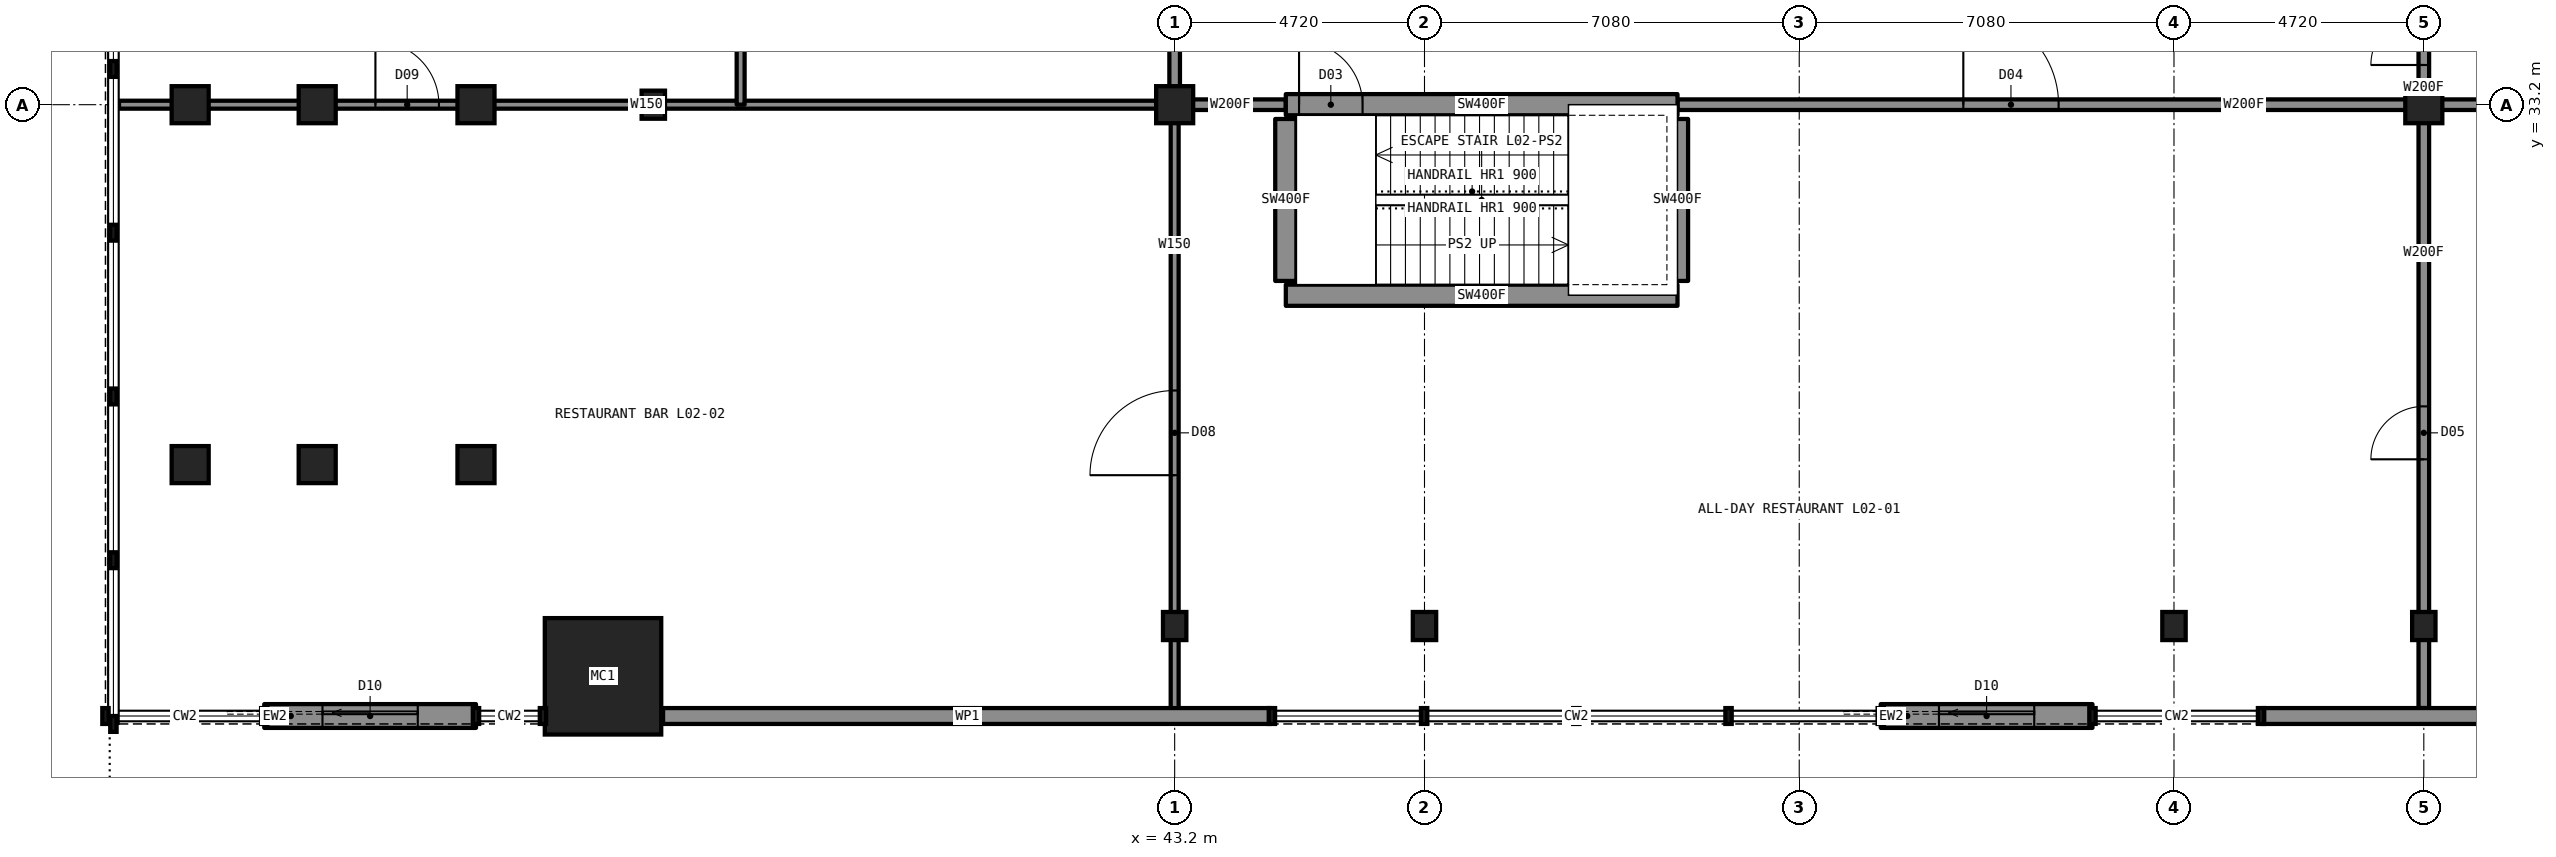
"""IFC4 building model, lengths in metres.
Left out: names, types, materials, properties, quantities, classifications, styles, units other than length and angle.
Written with IfcOpenShell. Run it as: python <this file> out.ifc"""

import sys

from ifc_helpers import new_model, si_unit, direction, frame, frame_2d, origin, origin_2d, place, context, subcontext, project, spatial, rectangle, hollow_rectangle, i_section, extrude, element, fill, save


model = new_model("IFC4")
c1 = context("Model", 3, precision=1e-05, world=origin(), true_north=direction((0.0, 1.0)))
c2 = subcontext(c1, "Body", "Model", "MODEL_VIEW")
j1 = project(units=[si_unit("LENGTHUNIT", "METRE"), si_unit("PLANEANGLEUNIT", "RADIAN")], contexts=[c1])
p1 = place(None, origin())
s1 = spatial("IfcSite", under=j1, at=p1, CompositionType="ELEMENT")
p2 = place(p1, origin())
s2 = spatial("IfcBuilding", under=s1, at=p2, CompositionType="ELEMENT")
p3 = place(p2, frame((0.0, 0.0, 11.0)))
s3 = spatial("IfcBuildingStorey", under=s2, at=p3, CompositionType="ELEMENT", Elevation=11.0)
for number, where, z_axis, x_axis in (
    (1, (33.35, 33.2, 0.0), (0.0, 0.0, 1.0), (1.0, 0.0, 0.0)),
    (2, (43.2, 23.35, 0.0), (0.0, 0.0, 1.0), (1.0, 0.0, 0.0)),
    (3, (47.92, 23.35, 0.0), (0.0, 0.0, 1.0), (1.0, 0.0, 0.0)),
    (4, (62.08, 23.35, 0.0), (0.0, 0.0, 1.0), (1.0, 0.0, 0.0)),
    (5, (66.8, 23.35, 0.0), (0.0, 0.0, 1.0), (1.0, 0.0, 0.0)),
):
    element("IfcColumn", number, at=place(p3, frame(where, z_axis=z_axis, x_axis=x_axis)), inside=s3, PredefinedType="COLUMN", context=c2, shape_type="SweptSolid", body=[
        extrude(i_section(OverallWidth=0.442, OverallDepth=0.531, WebThickness=0.066, FlangeThickness=0.106, at=origin_2d()), origin(), (0.0, 0.0, 1.0), 5.0),
    ])
for number, where, z_axis, x_axis in (
    (6, (43.2, 33.2, 0.0), (0.0, 0.0, 1.0), (1.0, 0.0, 0.0)),
    (7, (66.8, 33.2, 0.0), (0.0, 0.0, 1.0), (1.0, 0.0, 0.0)),
):
    element("IfcColumn", number, at=place(p3, frame(where, z_axis=z_axis, x_axis=x_axis)), inside=s3, PredefinedType="COLUMN", context=c2, shape_type="SweptSolid", body=[
        extrude(hollow_rectangle(XDim=0.7, YDim=0.7, WallThickness=0.06, at=origin_2d()), origin(), (0.0, 0.0, 1.0), 5.0),
    ])
p4 = place(p3, frame((32.4, 22.4, 0.0), z_axis=(0.0, 0.0, 1.0), x_axis=(1.0, 0.0, 0.0)))
e8 = element("IfcColumn", 8, at=p4, inside=s3, PredefinedType="COLUMN", context=c2, shape_type="SweptSolid", body=[
    extrude(hollow_rectangle(XDim=2.2, YDim=2.2, WallThickness=0.15, at=origin_2d()), origin(), (0.0, 0.0, 1.0), 5.0),
])
for number, where, z_axis, x_axis in (
    (9, (24.6, 26.4, 0.0), (0.0, 0.0, 1.0), (1.0, 0.0, 0.0)),
    (10, (24.6, 33.2, 0.0), (0.0, 0.0, 1.0), (1.0, 0.0, 0.0)),
    (11, (27.0, 26.4, 0.0), (0.0, 0.0, 1.0), (1.0, 0.0, 0.0)),
    (12, (27.0, 33.2, 0.0), (0.0, 0.0, 1.0), (1.0, 0.0, 0.0)),
    (13, (30.0, 26.4, 0.0), (0.0, 0.0, 1.0), (1.0, 0.0, 0.0)),
    (14, (30.0, 33.2, 0.0), (0.0, 0.0, 1.0), (1.0, 0.0, 0.0)),
):
    element("IfcColumn", number, at=place(p3, frame(where, z_axis=z_axis, x_axis=x_axis)), inside=s3, PredefinedType="COLUMN", context=c2, shape_type="SweptSolid", body=[
        extrude(rectangle(XDim=0.7, YDim=0.7, at=origin_2d()), origin(), (0.0, 0.0, 1.0), 5.0),
    ])
p5 = place(p3, frame((43.2, 33.2, 0.0), z_axis=(0.0, 0.0, 1.0), x_axis=(1.0, 0.0, 0.0)))
e15 = element("IfcWall", 15, at=p5, inside=s3, PredefinedType="PARTITIONING", context=c2, shape_type="SweptSolid", body=[
    extrude(rectangle(XDim=2.1, YDim=0.2, at=frame_2d((1.05, 0.0))), origin(), (0.0, 0.0, 1.0), 4.65),
])
p6 = place(p3, frame((52.7, 33.2, 0.0), z_axis=(0.0, 0.0, 1.0), x_axis=(1.0, 0.0, 0.0)))
e16 = element("IfcWall", 16, at=p6, inside=s3, PredefinedType="PARTITIONING", context=c2, shape_type="SweptSolid", body=[
    extrude(rectangle(XDim=14.1, YDim=0.2, at=frame_2d((7.05, 0.0))), origin(), (0.0, 0.0, 1.0), 4.65),
])
p7 = place(p6, frame((5.4, 0.0, 0.0)))
e17 = element("IfcOpeningElement", 17, at=p7, cuts=e16, PredefinedType="OPENING", context=c2, shape_type="SweptSolid", body=[
    extrude(rectangle(XDim=1.8, YDim=2.2, at=frame_2d((0.9, 1.1))), frame((0.0, 0.11, 0.0), z_axis=(0.0, -1.0, 0.0), x_axis=(1.0, 0.0, 0.0)), (0.0, 0.0, 1.0), 0.22),
])
p8 = place(p3, frame((66.8, 33.2, 0.0), z_axis=(0.0, 0.0, 1.0), x_axis=(1.0, 0.0, 0.0)))
e18 = element("IfcWall", 18, at=p8, inside=s3, PredefinedType="PARTITIONING", context=c2, shape_type="SweptSolid", body=[
    extrude(rectangle(XDim=12.9, YDim=0.2, at=frame_2d((6.45, 0.0))), origin(), (0.0, 0.0, 1.0), 4.65),
])
p9 = place(p8, frame((5.7, 0.0, 0.0)))
e19 = element("IfcOpeningElement", 19, at=p9, cuts=e18, PredefinedType="OPENING", context=c2, shape_type="SweptSolid", body=[
    extrude(rectangle(XDim=1.0, YDim=2.1, at=frame_2d((0.5, 1.05))), frame((0.0, 0.11, 0.0), z_axis=(0.0, -1.0, 0.0), x_axis=(1.0, 0.0, 0.0)), (0.0, 0.0, 1.0), 0.22),
])
p10 = place(p3, frame((23.255, 33.2, 0.0), z_axis=(0.0, 0.0, 1.0), x_axis=(1.0, 0.0, 0.0)))
e20 = element("IfcWall", 20, at=p10, inside=s3, PredefinedType="PARTITIONING", context=c2, shape_type="SweptSolid", body=[
    extrude(rectangle(XDim=19.945, YDim=0.15, at=frame_2d((9.973, 0.0))), origin(), (0.0, 0.0, 1.0), 4.65),
])
p11 = place(p10, frame((4.845, 0.0, 0.0)))
e21 = element("IfcOpeningElement", 21, at=p11, cuts=e20, PredefinedType="OPENING", context=c2, shape_type="SweptSolid", body=[
    extrude(rectangle(XDim=1.2, YDim=2.2, at=frame_2d((0.6, 1.1))), frame((0.0, 0.085, 0.0), z_axis=(0.0, -1.0, 0.0), x_axis=(1.0, 0.0, 0.0)), (0.0, 0.0, 1.0), 0.17),
])
p12 = place(p3, frame((45.3, 33.2, 0.0), z_axis=(0.0, 0.0, 1.0), x_axis=(1.0, 0.0, 0.0)))
e22 = element("IfcWall", 22, at=p12, inside=s3, PredefinedType="SHEAR", context=c2, shape_type="SweptSolid", body=[
    extrude(rectangle(XDim=7.4, YDim=0.4, at=frame_2d((3.7, 0.0))), origin(), (0.0, 0.0, 1.0), 5.0),
])
p13 = place(p12, frame((0.25, 0.0, 0.0)))
e23 = element("IfcOpeningElement", 23, at=p13, cuts=e22, PredefinedType="OPENING", context=c2, shape_type="SweptSolid", body=[
    extrude(rectangle(XDim=1.2, YDim=2.2, at=frame_2d((0.6, 1.1))), frame((0.0, 0.21, 0.0), z_axis=(0.0, -1.0, 0.0), x_axis=(1.0, 0.0, 0.0)), (0.0, 0.0, 1.0), 0.42),
])
p14 = place(p3, frame((45.3, 29.6, 0.0), z_axis=(0.0, 0.0, 1.0), x_axis=(1.0, 0.0, 0.0)))
e24 = element("IfcWall", 24, at=p14, inside=s3, PredefinedType="SHEAR", context=c2, shape_type="SweptSolid", body=[
    extrude(rectangle(XDim=7.4, YDim=0.4, at=frame_2d((3.7, 0.0))), origin(), (0.0, 0.0, 1.0), 5.0),
])
p15 = place(p3, frame((43.2, 33.2, 0.0), z_axis=(0.0, 0.0, 1.0), x_axis=(0.0, 1.0, 0.0)))
e25 = element("IfcWall", 25, at=p15, inside=s3, PredefinedType="PARTITIONING", context=c2, shape_type="SweptSolid", body=[
    extrude(rectangle(XDim=14.1, YDim=0.2, at=frame_2d((7.05, 0.0))), origin(), (0.0, 0.0, 1.0), 4.65),
])
p16 = place(p15, frame((12.4, 0.0, 0.0)))
e26 = element("IfcOpeningElement", 26, at=p16, cuts=e25, PredefinedType="OPENING", context=c2, shape_type="SweptSolid", body=[
    extrude(rectangle(XDim=1.0, YDim=2.1, at=frame_2d((0.5, 1.05))), frame((0.0, 0.11, 0.0), z_axis=(0.0, -1.0, 0.0), x_axis=(1.0, 0.0, 0.0)), (0.0, 0.0, 1.0), 0.22),
])
p17 = place(p15, frame((2.45, 0.0, 0.0)))
e27 = element("IfcOpeningElement", 27, at=p17, cuts=e25, PredefinedType="OPENING", context=c2, shape_type="SweptSolid", body=[
    extrude(rectangle(XDim=0.9, YDim=2.1, at=frame_2d((0.45, 1.05))), frame((0.0, 0.11, 0.0), z_axis=(0.0, -1.0, 0.0), x_axis=(1.0, 0.0, 0.0)), (0.0, 0.0, 1.0), 0.22),
])
p18 = place(p15, frame((8.25, 0.0, 0.0)))
e28 = element("IfcOpeningElement", 28, at=p18, cuts=e25, PredefinedType="OPENING", context=c2, shape_type="SweptSolid", body=[
    extrude(rectangle(XDim=0.9, YDim=2.1, at=frame_2d((0.45, 1.05))), frame((0.0, 0.11, 0.0), z_axis=(0.0, -1.0, 0.0), x_axis=(1.0, 0.0, 0.0)), (0.0, 0.0, 1.0), 0.22),
])
p19 = place(p3, frame((43.2, 21.755, 0.0), z_axis=(0.0, 0.0, 1.0), x_axis=(0.0, 1.0, 0.0)))
e29 = element("IfcWall", 29, at=p19, inside=s3, PredefinedType="PARTITIONING", context=c2, shape_type="SweptSolid", body=[
    extrude(rectangle(XDim=11.445, YDim=0.15, at=frame_2d((5.723, 0.0))), origin(), (0.0, 0.0, 1.0), 4.65),
])
p20 = place(p19, frame((4.445, 0.0, 0.0)))
e30 = element("IfcOpeningElement", 30, at=p20, cuts=e29, PredefinedType="OPENING", context=c2, shape_type="SweptSolid", body=[
    extrude(rectangle(XDim=1.6, YDim=2.4, at=frame_2d((0.8, 1.2))), frame((0.0, 0.085, 0.0), z_axis=(0.0, -1.0, 0.0), x_axis=(1.0, 0.0, 0.0)), (0.0, 0.0, 1.0), 0.17),
])
p21 = place(p3, frame((52.7, 29.87, 0.0), z_axis=(0.0, 0.0, 1.0), x_axis=(0.0, 1.0, 0.0)))
e31 = element("IfcWall", 31, at=p21, inside=s3, PredefinedType="SHEAR", context=c2, shape_type="SweptSolid", body=[
    extrude(rectangle(XDim=3.06, YDim=0.4, at=frame_2d((1.53, 0.0))), origin(), (0.0, 0.0, 1.0), 5.0),
])
p22 = place(p3, frame((35.0, 33.2, 0.0), z_axis=(0.0, 0.0, 1.0), x_axis=(0.0, 1.0, 0.0)))
e32 = element("IfcWall", 32, at=p22, inside=s3, PredefinedType="PARTITIONING", context=c2, shape_type="SweptSolid", body=[
    extrude(rectangle(XDim=23.6, YDim=0.15, at=frame_2d((11.8, 0.0))), origin(), (0.0, 0.0, 1.0), 4.65),
])
p23 = place(p3, frame((45.3, 29.87, 0.0), z_axis=(0.0, 0.0, 1.0), x_axis=(0.0, 1.0, 0.0)))
e33 = element("IfcWall", 33, at=p23, inside=s3, PredefinedType="SHEAR", context=c2, shape_type="SweptSolid", body=[
    extrude(rectangle(XDim=3.06, YDim=0.4, at=frame_2d((1.53, 0.0))), origin(), (0.0, 0.0, 1.0), 5.0),
])
p24 = place(p3, frame((66.8, 33.2, 0.0), z_axis=(0.0, 0.0, 1.0), x_axis=(0.0, 1.0, 0.0)))
e34 = element("IfcWall", 34, at=p24, inside=s3, PredefinedType="PARTITIONING", context=c2, shape_type="SweptSolid", body=[
    extrude(rectangle(XDim=2.1, YDim=0.2, at=frame_2d((1.05, 0.0))), origin(), (0.0, 0.0, 1.0), 4.65),
])
p25 = place(p24, frame((0.75, 0.0, 0.0)))
e35 = element("IfcOpeningElement", 35, at=p25, cuts=e34, PredefinedType="OPENING", context=c2, shape_type="SweptSolid", body=[
    extrude(rectangle(XDim=1.0, YDim=2.1, at=frame_2d((0.5, 1.05))), frame((0.0, 0.11, 0.0), z_axis=(0.0, -1.0, 0.0), x_axis=(1.0, 0.0, 0.0)), (0.0, 0.0, 1.0), 0.22),
])
p26 = place(p3, frame((66.8, 21.8, 0.0), z_axis=(0.0, 0.0, 1.0), x_axis=(0.0, 1.0, 0.0)))
e36 = element("IfcWall", 36, at=p26, inside=s3, PredefinedType="PARTITIONING", context=c2, shape_type="SweptSolid", body=[
    extrude(rectangle(XDim=11.4, YDim=0.2, at=frame_2d((5.7, 0.0))), origin(), (0.0, 0.0, 1.0), 4.65),
])
p27 = place(p26, frame((4.7, 0.0, 0.0)))
e37 = element("IfcOpeningElement", 37, at=p27, cuts=e36, PredefinedType="OPENING", context=c2, shape_type="SweptSolid", body=[
    extrude(rectangle(XDim=1.0, YDim=2.1, at=frame_2d((0.5, 1.05))), frame((0.0, 0.11, 0.0), z_axis=(0.0, -1.0, 0.0), x_axis=(1.0, 0.0, 0.0)), (0.0, 0.0, 1.0), 0.22),
])
p28 = place(p3, frame((26.0, 21.65, 0.0), z_axis=(0.0, 0.0, 1.0), x_axis=(1.0, 0.0, 0.0)))
e38 = element("IfcWall", 38, at=p28, inside=s3, PredefinedType="SOLIDWALL", context=c2, shape_type="SweptSolid", body=[
    extrude(rectangle(XDim=4.0, YDim=0.45, at=frame_2d((2.0, 0.0))), origin(), (0.0, 0.0, 1.0), 4.65),
])
p29 = place(p28, frame((1.1, 0.0, 0.0)))
e39 = element("IfcOpeningElement", 39, at=p29, cuts=e38, PredefinedType="OPENING", context=c2, shape_type="SweptSolid", body=[
    extrude(rectangle(XDim=1.8, YDim=2.4, at=frame_2d((0.9, 1.2))), frame((0.0, 0.235, 0.0), z_axis=(0.0, -1.0, 0.0), x_axis=(1.0, 0.0, 0.0)), (0.0, 0.0, 1.0), 0.47),
])
p30 = place(p3, frame((56.54, 21.65, 0.0), z_axis=(0.0, 0.0, 1.0), x_axis=(1.0, 0.0, 0.0)))
e40 = element("IfcWall", 40, at=p30, inside=s3, PredefinedType="SOLIDWALL", context=c2, shape_type="SweptSolid", body=[
    extrude(rectangle(XDim=4.0, YDim=0.45, at=frame_2d((2.0, 0.0))), origin(), (0.0, 0.0, 1.0), 4.65),
])
p31 = place(p30, frame((1.1, 0.0, 0.0)))
e41 = element("IfcOpeningElement", 41, at=p31, cuts=e40, PredefinedType="OPENING", context=c2, shape_type="SweptSolid", body=[
    extrude(rectangle(XDim=1.8, YDim=2.4, at=frame_2d((0.9, 1.2))), frame((0.0, 0.235, 0.0), z_axis=(0.0, -1.0, 0.0), x_axis=(1.0, 0.0, 0.0)), (0.0, 0.0, 1.0), 0.47),
])
p32 = place(p3, frame((33.534, 21.65, 0.0), z_axis=(0.0, 0.0, 1.0), x_axis=(1.0, 0.0, 0.0)))
e42 = element("IfcWall", 42, at=p32, inside=s3, PredefinedType="SOLIDWALL", context=c2, shape_type="SweptSolid", body=[
    extrude(rectangle(XDim=11.503, YDim=0.3, at=frame_2d((5.751, 0.0))), origin(), (0.0, 0.0, 1.0), 4.65),
])
p33 = place(p3, frame((63.725, 21.65, 0.0), z_axis=(0.0, 0.0, 1.0), x_axis=(1.0, 0.0, 0.0)))
e43 = element("IfcWall", 43, at=p33, inside=s3, PredefinedType="SOLIDWALL", context=c2, shape_type="SweptSolid", body=[
    extrude(rectangle(XDim=12.74, YDim=0.3, at=frame_2d((6.37, 0.0))), origin(), (0.0, 0.0, 1.0), 4.65),
])
p34 = place(p13, origin())
e44 = element("IfcDoor", 44, at=p34, inside=s3, OperationType="SINGLE_SWING_LEFT", PredefinedType="DOOR", context=c2, shape_type="SweptSolid", body=[
    extrude(rectangle(XDim=1.2, YDim=2.2, at=frame_2d((0.6, 1.1))), frame((0.0, 0.025, 0.0), z_axis=(0.0, -1.0, 0.0), x_axis=(1.0, 0.0, 0.0)), (0.0, 0.0, 1.0), 0.05),
])
fill(e23, e44)
p35 = place(p7, origin())
e45 = element("IfcDoor", 45, at=p35, inside=s3, OperationType="DOUBLE_DOOR_SINGLE_SWING", PredefinedType="DOOR", context=c2, shape_type="SweptSolid", body=[
    extrude(rectangle(XDim=1.8, YDim=2.2, at=frame_2d((0.9, 1.1))), frame((0.0, 0.025, 0.0), z_axis=(0.0, -1.0, 0.0), x_axis=(1.0, 0.0, 0.0)), (0.0, 0.0, 1.0), 0.05),
])
fill(e17, e45)
p36 = place(p20, origin())
e46 = element("IfcDoor", 46, at=p36, inside=s3, OperationType="DOUBLE_DOOR_SINGLE_SWING", PredefinedType="DOOR", context=c2, shape_type="SweptSolid", body=[
    extrude(rectangle(XDim=1.6, YDim=2.4, at=frame_2d((0.8, 1.2))), frame((0.0, 0.025, 0.0), z_axis=(0.0, -1.0, 0.0), x_axis=(1.0, 0.0, 0.0)), (0.0, 0.0, 1.0), 0.05),
])
fill(e30, e46)
p37 = place(p27, origin())
e47 = element("IfcDoor", 47, at=p37, inside=s3, OperationType="SINGLE_SWING_LEFT", PredefinedType="DOOR", context=c2, shape_type="SweptSolid", body=[
    extrude(rectangle(XDim=1.0, YDim=2.1, at=frame_2d((0.5, 1.05))), frame((0.0, 0.025, 0.0), z_axis=(0.0, -1.0, 0.0), x_axis=(1.0, 0.0, 0.0)), (0.0, 0.0, 1.0), 0.05),
])
fill(e37, e47)
p38 = place(p11, origin())
e48 = element("IfcDoor", 48, at=p38, inside=s3, OperationType="SINGLE_SWING_LEFT", PredefinedType="DOOR", context=c2, shape_type="SweptSolid", body=[
    extrude(rectangle(XDim=1.2, YDim=2.2, at=frame_2d((0.6, 1.1))), frame((0.0, 0.025, 0.0), z_axis=(0.0, -1.0, 0.0), x_axis=(1.0, 0.0, 0.0)), (0.0, 0.0, 1.0), 0.05),
])
fill(e21, e48)
p39 = place(p25, origin())
e49 = element("IfcDoor", 49, at=p39, inside=s3, OperationType="SINGLE_SWING_LEFT", PredefinedType="DOOR", context=c2, shape_type="SweptSolid", body=[
    extrude(rectangle(XDim=1.0, YDim=2.1, at=frame_2d((0.5, 1.05))), frame((0.0, 0.025, 0.0), z_axis=(0.0, -1.0, 0.0), x_axis=(1.0, 0.0, 0.0)), (0.0, 0.0, 1.0), 0.05),
])
fill(e35, e49)
p40 = place(p29, origin())
e50 = element("IfcDoor", 50, at=p40, inside=s3, OperationType="SLIDING_TO_LEFT", PredefinedType="DOOR", context=c2, shape_type="SweptSolid", body=[
    extrude(rectangle(XDim=1.8, YDim=2.4, at=frame_2d((0.9, 1.2))), frame((0.0, 0.025, 0.0), z_axis=(0.0, -1.0, 0.0), x_axis=(1.0, 0.0, 0.0)), (0.0, 0.0, 1.0), 0.05),
])
fill(e39, e50)
p41 = place(p31, origin())
e51 = element("IfcDoor", 51, at=p41, inside=s3, OperationType="SLIDING_TO_LEFT", PredefinedType="DOOR", context=c2, shape_type="SweptSolid", body=[
    extrude(rectangle(XDim=1.8, YDim=2.4, at=frame_2d((0.9, 1.2))), frame((0.0, 0.025, 0.0), z_axis=(0.0, -1.0, 0.0), x_axis=(1.0, 0.0, 0.0)), (0.0, 0.0, 1.0), 0.05),
])
fill(e41, e51)
save(model, sys.argv[1])
